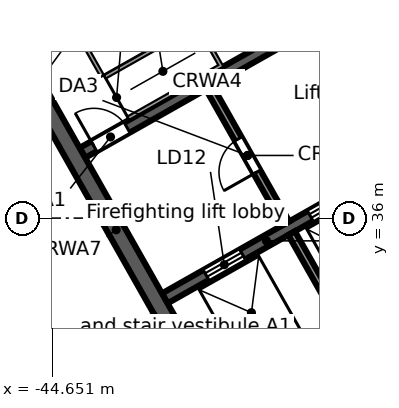
"""IFC4 building model, lengths in metres.
Left out: names, types, materials, properties, quantities, classifications, styles, units other than length and angle.
Written with IfcOpenShell. Run it as: python <this file> out.ifc"""

import sys

from ifc_helpers import new_model, si_unit, direction, frame, frame_2d, origin, place, context, subcontext, project, spatial, rectangle, extrude, element, fill, save


model = new_model("IFC4")
c1 = context("Model", 3, precision=1e-05, world=origin(), true_north=direction((0.0, 1.0)))
c2 = subcontext(c1, "Body", "Model", "MODEL_VIEW")
j1 = project(units=[si_unit("LENGTHUNIT", "METRE"), si_unit("PLANEANGLEUNIT", "RADIAN")], contexts=[c1])
p1 = place(None, origin())
s1 = spatial("IfcSite", under=j1, at=p1, CompositionType="ELEMENT")
p2 = place(p1, origin())
s2 = spatial("IfcBuilding", under=s1, at=p2, CompositionType="ELEMENT")
p3 = place(p2, frame((0.0, 0.0, 223.1)))
s3 = spatial("IfcBuildingStorey", under=s2, at=p3, CompositionType="ELEMENT", Elevation=223.1)
p4 = place(p3, frame((-0.046, 47.974, 0.0), z_axis=(0.0, 0.0, 1.0), x_axis=(-0.870356579543, -0.492421998337, 0.0)))
e1 = element("IfcWall", 1, at=p4, inside=s3, PredefinedType="STANDARD", context=c2, shape_type="SweptSolid", body=[
    extrude(rectangle(XDim=43.754, YDim=0.25, at=frame_2d((21.877, 0.0))), origin(), (0.0, 0.0, 1.0), 3.62),
])
p5 = place(p4, frame((41.061, 0.0, 0.8)))
e2 = element("IfcOpeningElement", 2, at=p5, cuts=e1, PredefinedType="OPENING", context=c2, shape_type="SweptSolid", body=[
    extrude(rectangle(XDim=2.4, YDim=2.2, at=frame_2d((1.2, 1.1))), frame((0.0, 0.135, 0.0), z_axis=(0.0, -1.0, 0.0), x_axis=(1.0, 0.0, 0.0)), (0.0, 0.0, 1.0), 0.27),
])
p6 = place(p4, frame((38.443, 0.0, 0.0)))
e3 = element("IfcOpeningElement", 3, at=p6, cuts=e1, PredefinedType="OPENING", context=c2, shape_type="SweptSolid", body=[
    extrude(rectangle(XDim=1.8, YDim=2.4, at=frame_2d((0.9, 1.2))), frame((0.0, 0.135, 0.0), z_axis=(0.0, -1.0, 0.0), x_axis=(1.0, 0.0, 0.0)), (0.0, 0.0, 1.0), 0.27),
])
p7 = place(p4, frame((35.225, 0.0, 0.8)))
e4 = element("IfcOpeningElement", 4, at=p7, cuts=e1, PredefinedType="OPENING", context=c2, shape_type="SweptSolid", body=[
    extrude(rectangle(XDim=2.4, YDim=2.2, at=frame_2d((1.2, 1.1))), frame((0.0, 0.135, 0.0), z_axis=(0.0, -1.0, 0.0), x_axis=(1.0, 0.0, 0.0)), (0.0, 0.0, 1.0), 0.27),
])
p8 = place(p4, frame((32.307, 0.0, 0.8)))
e5 = element("IfcOpeningElement", 5, at=p8, cuts=e1, PredefinedType="OPENING", context=c2, shape_type="SweptSolid", body=[
    extrude(rectangle(XDim=2.4, YDim=2.2, at=frame_2d((1.2, 1.1))), frame((0.0, 0.135, 0.0), z_axis=(0.0, -1.0, 0.0), x_axis=(1.0, 0.0, 0.0)), (0.0, 0.0, 1.0), 0.27),
])
p9 = place(p4, frame((29.688, 0.0, 0.0)))
e6 = element("IfcOpeningElement", 6, at=p9, cuts=e1, PredefinedType="OPENING", context=c2, shape_type="SweptSolid", body=[
    extrude(rectangle(XDim=1.8, YDim=2.4, at=frame_2d((0.9, 1.2))), frame((0.0, 0.135, 0.0), z_axis=(0.0, -1.0, 0.0), x_axis=(1.0, 0.0, 0.0)), (0.0, 0.0, 1.0), 0.27),
])
p10 = place(p4, frame((26.47, 0.0, 0.8)))
e7 = element("IfcOpeningElement", 7, at=p10, cuts=e1, PredefinedType="OPENING", context=c2, shape_type="SweptSolid", body=[
    extrude(rectangle(XDim=2.4, YDim=2.2, at=frame_2d((1.2, 1.1))), frame((0.0, 0.135, 0.0), z_axis=(0.0, -1.0, 0.0), x_axis=(1.0, 0.0, 0.0)), (0.0, 0.0, 1.0), 0.27),
])
p11 = place(p4, frame((23.552, 0.0, 0.8)))
e8 = element("IfcOpeningElement", 8, at=p11, cuts=e1, PredefinedType="OPENING", context=c2, shape_type="SweptSolid", body=[
    extrude(rectangle(XDim=2.4, YDim=2.2, at=frame_2d((1.2, 1.1))), frame((0.0, 0.135, 0.0), z_axis=(0.0, -1.0, 0.0), x_axis=(1.0, 0.0, 0.0)), (0.0, 0.0, 1.0), 0.27),
])
p12 = place(p4, frame((20.934, 0.0, 0.0)))
e9 = element("IfcOpeningElement", 9, at=p12, cuts=e1, PredefinedType="OPENING", context=c2, shape_type="SweptSolid", body=[
    extrude(rectangle(XDim=1.8, YDim=2.4, at=frame_2d((0.9, 1.2))), frame((0.0, 0.135, 0.0), z_axis=(0.0, -1.0, 0.0), x_axis=(1.0, 0.0, 0.0)), (0.0, 0.0, 1.0), 0.27),
])
p13 = place(p4, frame((17.716, 0.0, 0.8)))
e10 = element("IfcOpeningElement", 10, at=p13, cuts=e1, PredefinedType="OPENING", context=c2, shape_type="SweptSolid", body=[
    extrude(rectangle(XDim=2.4, YDim=2.2, at=frame_2d((1.2, 1.1))), frame((0.0, 0.135, 0.0), z_axis=(0.0, -1.0, 0.0), x_axis=(1.0, 0.0, 0.0)), (0.0, 0.0, 1.0), 0.27),
])
p14 = place(p4, frame((14.798, 0.0, 0.8)))
e11 = element("IfcOpeningElement", 11, at=p14, cuts=e1, PredefinedType="OPENING", context=c2, shape_type="SweptSolid", body=[
    extrude(rectangle(XDim=2.4, YDim=2.2, at=frame_2d((1.2, 1.1))), frame((0.0, 0.135, 0.0), z_axis=(0.0, -1.0, 0.0), x_axis=(1.0, 0.0, 0.0)), (0.0, 0.0, 1.0), 0.27),
])
p15 = place(p4, frame((12.179, 0.0, 0.0)))
e12 = element("IfcOpeningElement", 12, at=p15, cuts=e1, PredefinedType="OPENING", context=c2, shape_type="SweptSolid", body=[
    extrude(rectangle(XDim=1.8, YDim=2.4, at=frame_2d((0.9, 1.2))), frame((0.0, 0.135, 0.0), z_axis=(0.0, -1.0, 0.0), x_axis=(1.0, 0.0, 0.0)), (0.0, 0.0, 1.0), 0.27),
])
p16 = place(p4, frame((8.961, 0.0, 0.8)))
e13 = element("IfcOpeningElement", 13, at=p16, cuts=e1, PredefinedType="OPENING", context=c2, shape_type="SweptSolid", body=[
    extrude(rectangle(XDim=2.4, YDim=2.2, at=frame_2d((1.2, 1.1))), frame((0.0, 0.135, 0.0), z_axis=(0.0, -1.0, 0.0), x_axis=(1.0, 0.0, 0.0)), (0.0, 0.0, 1.0), 0.27),
])
p17 = place(p4, frame((6.043, 0.0, 0.8)))
e14 = element("IfcOpeningElement", 14, at=p17, cuts=e1, PredefinedType="OPENING", context=c2, shape_type="SweptSolid", body=[
    extrude(rectangle(XDim=2.4, YDim=2.2, at=frame_2d((1.2, 1.1))), frame((0.0, 0.135, 0.0), z_axis=(0.0, -1.0, 0.0), x_axis=(1.0, 0.0, 0.0)), (0.0, 0.0, 1.0), 0.27),
])
p18 = place(p4, frame((3.425, 0.0, 0.0)))
e15 = element("IfcOpeningElement", 15, at=p18, cuts=e1, PredefinedType="OPENING", context=c2, shape_type="SweptSolid", body=[
    extrude(rectangle(XDim=1.8, YDim=2.4, at=frame_2d((0.9, 1.2))), frame((0.0, 0.135, 0.0), z_axis=(0.0, -1.0, 0.0), x_axis=(1.0, 0.0, 0.0)), (0.0, 0.0, 1.0), 0.27),
])
p19 = place(p4, frame((0.207, 0.0, 0.8)))
e16 = element("IfcOpeningElement", 16, at=p19, cuts=e1, PredefinedType="OPENING", context=c2, shape_type="SweptSolid", body=[
    extrude(rectangle(XDim=2.4, YDim=2.2, at=frame_2d((1.2, 1.1))), frame((0.0, 0.135, 0.0), z_axis=(0.0, -1.0, 0.0), x_axis=(1.0, 0.0, 0.0)), (0.0, 0.0, 1.0), 0.27),
])
p20 = place(p3, frame((-58.732, 38.771, 0.0), z_axis=(0.0, 0.0, 1.0), x_axis=(0.870354824205, 0.492425100887, 0.0)))
e17 = element("IfcWall", 17, at=p20, inside=s3, PredefinedType="STANDARD", context=c2, shape_type="SweptSolid", body=[
    extrude(rectangle(XDim=64.006, YDim=0.25, at=frame_2d((32.003, 0.0))), origin(), (0.0, 0.0, 1.0), 3.62),
])
p21 = place(p20, frame((61.259, 0.0, 0.8)))
e18 = element("IfcOpeningElement", 18, at=p21, cuts=e17, PredefinedType="OPENING", context=c2, shape_type="SweptSolid", body=[
    extrude(rectangle(XDim=2.4, YDim=2.2, at=frame_2d((1.2, 1.1))), frame((0.0, 0.135, 0.0), z_axis=(0.0, -1.0, 0.0), x_axis=(1.0, 0.0, 0.0)), (0.0, 0.0, 1.0), 0.27),
])
p22 = place(p20, frame((58.216, 0.0, 0.8)))
e19 = element("IfcOpeningElement", 19, at=p22, cuts=e17, PredefinedType="OPENING", context=c2, shape_type="SweptSolid", body=[
    extrude(rectangle(XDim=2.4, YDim=2.2, at=frame_2d((1.2, 1.1))), frame((0.0, 0.135, 0.0), z_axis=(0.0, -1.0, 0.0), x_axis=(1.0, 0.0, 0.0)), (0.0, 0.0, 1.0), 0.27),
])
p23 = place(p20, frame((55.173, 0.0, 0.8)))
e20 = element("IfcOpeningElement", 20, at=p23, cuts=e17, PredefinedType="OPENING", context=c2, shape_type="SweptSolid", body=[
    extrude(rectangle(XDim=2.4, YDim=2.2, at=frame_2d((1.2, 1.1))), frame((0.0, 0.135, 0.0), z_axis=(0.0, -1.0, 0.0), x_axis=(1.0, 0.0, 0.0)), (0.0, 0.0, 1.0), 0.27),
])
p24 = place(p20, frame((52.129, 0.0, 0.8)))
e21 = element("IfcOpeningElement", 21, at=p24, cuts=e17, PredefinedType="OPENING", context=c2, shape_type="SweptSolid", body=[
    extrude(rectangle(XDim=2.4, YDim=2.2, at=frame_2d((1.2, 1.1))), frame((0.0, 0.135, 0.0), z_axis=(0.0, -1.0, 0.0), x_axis=(1.0, 0.0, 0.0)), (0.0, 0.0, 1.0), 0.27),
])
p25 = place(p20, frame((49.086, 0.0, 0.8)))
e22 = element("IfcOpeningElement", 22, at=p25, cuts=e17, PredefinedType="OPENING", context=c2, shape_type="SweptSolid", body=[
    extrude(rectangle(XDim=2.4, YDim=2.2, at=frame_2d((1.2, 1.1))), frame((0.0, 0.135, 0.0), z_axis=(0.0, -1.0, 0.0), x_axis=(1.0, 0.0, 0.0)), (0.0, 0.0, 1.0), 0.27),
])
p26 = place(p20, frame((46.043, 0.0, 0.8)))
e23 = element("IfcOpeningElement", 23, at=p26, cuts=e17, PredefinedType="OPENING", context=c2, shape_type="SweptSolid", body=[
    extrude(rectangle(XDim=2.4, YDim=2.2, at=frame_2d((1.2, 1.1))), frame((0.0, 0.135, 0.0), z_axis=(0.0, -1.0, 0.0), x_axis=(1.0, 0.0, 0.0)), (0.0, 0.0, 1.0), 0.27),
])
p27 = place(p20, frame((43.0, 0.0, 0.8)))
e24 = element("IfcOpeningElement", 24, at=p27, cuts=e17, PredefinedType="OPENING", context=c2, shape_type="SweptSolid", body=[
    extrude(rectangle(XDim=2.4, YDim=2.2, at=frame_2d((1.2, 1.1))), frame((0.0, 0.135, 0.0), z_axis=(0.0, -1.0, 0.0), x_axis=(1.0, 0.0, 0.0)), (0.0, 0.0, 1.0), 0.27),
])
p28 = place(p20, frame((39.956, 0.0, 0.8)))
e25 = element("IfcOpeningElement", 25, at=p28, cuts=e17, PredefinedType="OPENING", context=c2, shape_type="SweptSolid", body=[
    extrude(rectangle(XDim=2.4, YDim=2.2, at=frame_2d((1.2, 1.1))), frame((0.0, 0.135, 0.0), z_axis=(0.0, -1.0, 0.0), x_axis=(1.0, 0.0, 0.0)), (0.0, 0.0, 1.0), 0.27),
])
p29 = place(p20, frame((36.913, 0.0, 0.8)))
e26 = element("IfcOpeningElement", 26, at=p29, cuts=e17, PredefinedType="OPENING", context=c2, shape_type="SweptSolid", body=[
    extrude(rectangle(XDim=2.4, YDim=2.2, at=frame_2d((1.2, 1.1))), frame((0.0, 0.135, 0.0), z_axis=(0.0, -1.0, 0.0), x_axis=(1.0, 0.0, 0.0)), (0.0, 0.0, 1.0), 0.27),
])
p30 = place(p20, frame((33.87, 0.0, 0.8)))
e27 = element("IfcOpeningElement", 27, at=p30, cuts=e17, PredefinedType="OPENING", context=c2, shape_type="SweptSolid", body=[
    extrude(rectangle(XDim=2.4, YDim=2.2, at=frame_2d((1.2, 1.1))), frame((0.0, 0.135, 0.0), z_axis=(0.0, -1.0, 0.0), x_axis=(1.0, 0.0, 0.0)), (0.0, 0.0, 1.0), 0.27),
])
p31 = place(p20, frame((30.826, 0.0, 0.8)))
e28 = element("IfcOpeningElement", 28, at=p31, cuts=e17, PredefinedType="OPENING", context=c2, shape_type="SweptSolid", body=[
    extrude(rectangle(XDim=2.4, YDim=2.2, at=frame_2d((1.2, 1.1))), frame((0.0, 0.135, 0.0), z_axis=(0.0, -1.0, 0.0), x_axis=(1.0, 0.0, 0.0)), (0.0, 0.0, 1.0), 0.27),
])
p32 = place(p20, frame((27.783, 0.0, 0.8)))
e29 = element("IfcOpeningElement", 29, at=p32, cuts=e17, PredefinedType="OPENING", context=c2, shape_type="SweptSolid", body=[
    extrude(rectangle(XDim=2.4, YDim=2.2, at=frame_2d((1.2, 1.1))), frame((0.0, 0.135, 0.0), z_axis=(0.0, -1.0, 0.0), x_axis=(1.0, 0.0, 0.0)), (0.0, 0.0, 1.0), 0.27),
])
p33 = place(p20, frame((24.74, 0.0, 0.8)))
e30 = element("IfcOpeningElement", 30, at=p33, cuts=e17, PredefinedType="OPENING", context=c2, shape_type="SweptSolid", body=[
    extrude(rectangle(XDim=2.4, YDim=2.2, at=frame_2d((1.2, 1.1))), frame((0.0, 0.135, 0.0), z_axis=(0.0, -1.0, 0.0), x_axis=(1.0, 0.0, 0.0)), (0.0, 0.0, 1.0), 0.27),
])
p34 = place(p20, frame((21.696, 0.0, 0.8)))
e31 = element("IfcOpeningElement", 31, at=p34, cuts=e17, PredefinedType="OPENING", context=c2, shape_type="SweptSolid", body=[
    extrude(rectangle(XDim=2.4, YDim=2.2, at=frame_2d((1.2, 1.1))), frame((0.0, 0.135, 0.0), z_axis=(0.0, -1.0, 0.0), x_axis=(1.0, 0.0, 0.0)), (0.0, 0.0, 1.0), 0.27),
])
p35 = place(p20, frame((18.653, 0.0, 0.8)))
e32 = element("IfcOpeningElement", 32, at=p35, cuts=e17, PredefinedType="OPENING", context=c2, shape_type="SweptSolid", body=[
    extrude(rectangle(XDim=2.4, YDim=2.2, at=frame_2d((1.2, 1.1))), frame((0.0, 0.135, 0.0), z_axis=(0.0, -1.0, 0.0), x_axis=(1.0, 0.0, 0.0)), (0.0, 0.0, 1.0), 0.27),
])
p36 = place(p20, frame((15.61, 0.0, 0.8)))
e33 = element("IfcOpeningElement", 33, at=p36, cuts=e17, PredefinedType="OPENING", context=c2, shape_type="SweptSolid", body=[
    extrude(rectangle(XDim=2.4, YDim=2.2, at=frame_2d((1.2, 1.1))), frame((0.0, 0.135, 0.0), z_axis=(0.0, -1.0, 0.0), x_axis=(1.0, 0.0, 0.0)), (0.0, 0.0, 1.0), 0.27),
])
p37 = place(p20, frame((12.567, 0.0, 0.8)))
e34 = element("IfcOpeningElement", 34, at=p37, cuts=e17, PredefinedType="OPENING", context=c2, shape_type="SweptSolid", body=[
    extrude(rectangle(XDim=2.4, YDim=2.2, at=frame_2d((1.2, 1.1))), frame((0.0, 0.135, 0.0), z_axis=(0.0, -1.0, 0.0), x_axis=(1.0, 0.0, 0.0)), (0.0, 0.0, 1.0), 0.27),
])
p38 = place(p20, frame((9.523, 0.0, 0.8)))
e35 = element("IfcOpeningElement", 35, at=p38, cuts=e17, PredefinedType="OPENING", context=c2, shape_type="SweptSolid", body=[
    extrude(rectangle(XDim=2.4, YDim=2.2, at=frame_2d((1.2, 1.1))), frame((0.0, 0.135, 0.0), z_axis=(0.0, -1.0, 0.0), x_axis=(1.0, 0.0, 0.0)), (0.0, 0.0, 1.0), 0.27),
])
p39 = place(p20, frame((6.48, 0.0, 0.8)))
e36 = element("IfcOpeningElement", 36, at=p39, cuts=e17, PredefinedType="OPENING", context=c2, shape_type="SweptSolid", body=[
    extrude(rectangle(XDim=2.4, YDim=2.2, at=frame_2d((1.2, 1.1))), frame((0.0, 0.135, 0.0), z_axis=(0.0, -1.0, 0.0), x_axis=(1.0, 0.0, 0.0)), (0.0, 0.0, 1.0), 0.27),
])
p40 = place(p20, frame((3.437, 0.0, 0.8)))
e37 = element("IfcOpeningElement", 37, at=p40, cuts=e17, PredefinedType="OPENING", context=c2, shape_type="SweptSolid", body=[
    extrude(rectangle(XDim=2.4, YDim=2.2, at=frame_2d((1.2, 1.1))), frame((0.0, 0.135, 0.0), z_axis=(0.0, -1.0, 0.0), x_axis=(1.0, 0.0, 0.0)), (0.0, 0.0, 1.0), 0.27),
])
p41 = place(p20, frame((0.393, 0.0, 0.8)))
e38 = element("IfcOpeningElement", 38, at=p41, cuts=e17, PredefinedType="OPENING", context=c2, shape_type="SweptSolid", body=[
    extrude(rectangle(XDim=2.4, YDim=2.2, at=frame_2d((1.2, 1.1))), frame((0.0, 0.135, 0.0), z_axis=(0.0, -1.0, 0.0), x_axis=(1.0, 0.0, 0.0)), (0.0, 0.0, 1.0), 0.27),
])
p42 = place(p3, frame((-44.115, 26.507, 0.0), z_axis=(0.0, 0.0, 1.0), x_axis=(-0.857166583633, 0.515039268311, 0.0)))
e39 = element("IfcWall", 39, at=p42, inside=s3, PredefinedType="STANDARD", context=c2, shape_type="SweptSolid", body=[
    extrude(rectangle(XDim=17.106, YDim=0.25, at=frame_2d((8.553, 0.0))), origin(), (0.0, 0.0, 1.0), 3.62),
])
p43 = place(p42, frame((14.417, 0.0, 0.8)))
e40 = element("IfcOpeningElement", 40, at=p43, cuts=e39, PredefinedType="OPENING", context=c2, shape_type="SweptSolid", body=[
    extrude(rectangle(XDim=2.4, YDim=2.2, at=frame_2d((1.2, 1.1))), frame((0.0, 0.135, 0.0), z_axis=(0.0, -1.0, 0.0), x_axis=(1.0, 0.0, 0.0)), (0.0, 0.0, 1.0), 0.27),
])
p44 = place(p42, frame((11.584, 0.0, 0.8)))
e41 = element("IfcOpeningElement", 41, at=p44, cuts=e39, PredefinedType="OPENING", context=c2, shape_type="SweptSolid", body=[
    extrude(rectangle(XDim=2.4, YDim=2.2, at=frame_2d((1.2, 1.1))), frame((0.0, 0.135, 0.0), z_axis=(0.0, -1.0, 0.0), x_axis=(1.0, 0.0, 0.0)), (0.0, 0.0, 1.0), 0.27),
])
p45 = place(p42, frame((8.75, 0.0, 0.8)))
e42 = element("IfcOpeningElement", 42, at=p45, cuts=e39, PredefinedType="OPENING", context=c2, shape_type="SweptSolid", body=[
    extrude(rectangle(XDim=2.4, YDim=2.2, at=frame_2d((1.2, 1.1))), frame((0.0, 0.135, 0.0), z_axis=(0.0, -1.0, 0.0), x_axis=(1.0, 0.0, 0.0)), (0.0, 0.0, 1.0), 0.27),
])
p46 = place(p42, frame((5.917, 0.0, 0.8)))
e43 = element("IfcOpeningElement", 43, at=p46, cuts=e39, PredefinedType="OPENING", context=c2, shape_type="SweptSolid", body=[
    extrude(rectangle(XDim=2.4, YDim=2.2, at=frame_2d((1.2, 1.1))), frame((0.0, 0.135, 0.0), z_axis=(0.0, -1.0, 0.0), x_axis=(1.0, 0.0, 0.0)), (0.0, 0.0, 1.0), 0.27),
])
p47 = place(p42, frame((3.084, 0.0, 0.8)))
e44 = element("IfcOpeningElement", 44, at=p47, cuts=e39, PredefinedType="OPENING", context=c2, shape_type="SweptSolid", body=[
    extrude(rectangle(XDim=2.4, YDim=2.2, at=frame_2d((1.2, 1.1))), frame((0.0, 0.135, 0.0), z_axis=(0.0, -1.0, 0.0), x_axis=(1.0, 0.0, 0.0)), (0.0, 0.0, 1.0), 0.27),
])
p48 = place(p42, frame((0.25, 0.0, 0.8)))
e45 = element("IfcOpeningElement", 45, at=p48, cuts=e39, PredefinedType="OPENING", context=c2, shape_type="SweptSolid", body=[
    extrude(rectangle(XDim=2.4, YDim=2.2, at=frame_2d((1.2, 1.1))), frame((0.0, 0.135, 0.0), z_axis=(0.0, -1.0, 0.0), x_axis=(1.0, 0.0, 0.0)), (0.0, 0.0, 1.0), 0.27),
])
p49 = place(p3, frame((-39.825, 29.684, 0.0), z_axis=(0.0, 0.0, 1.0), x_axis=(0.870353598469, 0.492427267353, 0.0)))
e46 = element("IfcWall", 46, at=p49, inside=s3, PredefinedType="SOLIDWALL", context=c2, shape_type="SweptSolid", body=[
    extrude(rectangle(XDim=17.0, YDim=0.45, at=frame_2d((8.5, 0.0))), origin(), (0.0, 0.0, 1.0), 3.62),
])
p50 = place(p49, frame((7.2, 0.0, 0.0)))
e47 = element("IfcOpeningElement", 47, at=p50, cuts=e46, PredefinedType="OPENING", context=c2, shape_type="SweptSolid", body=[
    extrude(rectangle(XDim=1.2, YDim=2.1, at=frame_2d((0.6, 1.05))), frame((0.0, 0.235, 0.0), z_axis=(0.0, -1.0, 0.0), x_axis=(1.0, 0.0, 0.0)), (0.0, 0.0, 1.0), 0.47),
])
p51 = place(p3, frame((-41.687, 33.887, 0.0), z_axis=(0.0, 0.0, 1.0), x_axis=(0.870355736587, 0.49242348826, 0.0)))
e48 = element("IfcWall", 48, at=p51, inside=s3, PredefinedType="SOLIDWALL", context=c2, shape_type="SweptSolid", body=[
    extrude(rectangle(XDim=6.15, YDim=0.3, at=frame_2d((3.075, 0.0))), origin(), (0.0, 0.0, 1.0), 3.62),
])
p52 = place(p51, frame((1.25, 0.0, 0.0)))
e49 = element("IfcOpeningElement", 49, at=p52, cuts=e48, PredefinedType="OPENING", context=c2, shape_type="SweptSolid", body=[
    extrude(rectangle(XDim=1.1, YDim=2.1, at=frame_2d((0.55, 1.05))), frame((0.0, 0.16, 0.0), z_axis=(0.0, -1.0, 0.0), x_axis=(1.0, 0.0, 0.0)), (0.0, 0.0, 1.0), 0.32),
])
p53 = place(p51, frame((4.4, 0.0, 0.0)))
e50 = element("IfcOpeningElement", 50, at=p53, cuts=e48, PredefinedType="OPENING", context=c2, shape_type="SweptSolid", body=[
    extrude(rectangle(XDim=1.1, YDim=2.1, at=frame_2d((0.55, 1.05))), frame((0.0, 0.16, 0.0), z_axis=(0.0, -1.0, 0.0), x_axis=(1.0, 0.0, 0.0)), (0.0, 0.0, 1.0), 0.32),
])
p54 = place(p3, frame((-43.853, 37.717, 0.0), z_axis=(0.0, 0.0, 1.0), x_axis=(0.870360409231, 0.492415229297, 0.0)))
e51 = element("IfcWall", 51, at=p54, inside=s3, PredefinedType="SOLIDWALL", context=c2, shape_type="SweptSolid", body=[
    extrude(rectangle(XDim=7.55, YDim=0.3, at=frame_2d((3.775, 0.0))), origin(), (0.0, 0.0, 1.0), 3.62),
])
p55 = place(p54, frame((0.35, 0.0, 0.0)))
e52 = element("IfcOpeningElement", 52, at=p55, cuts=e51, PredefinedType="OPENING", context=c2, shape_type="SweptSolid", body=[
    extrude(rectangle(XDim=1.0, YDim=2.1, at=frame_2d((0.5, 1.05))), frame((0.0, 0.16, 0.0), z_axis=(0.0, -1.0, 0.0), x_axis=(1.0, 0.0, 0.0)), (0.0, 0.0, 1.0), 0.32),
])
p56 = place(p3, frame((-46.191, 41.392, 0.0), z_axis=(0.0, 0.0, 1.0), x_axis=(0.492421378713, -0.870356930107, 0.0)))
e53 = element("IfcWall", 53, at=p56, inside=s3, PredefinedType="SOLIDWALL", context=c2, shape_type="SweptSolid", body=[
    extrude(rectangle(XDim=13.1, YDim=0.45, at=frame_2d((6.55, 0.0))), origin(), (0.0, 0.0, 1.0), 3.62),
])
p57 = place(p3, frame((-38.349, 35.603, 0.0), z_axis=(0.0, 0.0, 1.0), x_axis=(0.492409653846, -0.870363563575, 0.0)))
e54 = element("IfcWall", 54, at=p57, inside=s3, PredefinedType="SOLIDWALL", context=c2, shape_type="SweptSolid", body=[
    extrude(rectangle(XDim=4.2, YDim=0.2, at=frame_2d((2.1, 0.0))), origin(), (0.0, 0.0, 1.0), 3.62),
])
p58 = place(p3, frame((-40.516, 39.433, 0.0), z_axis=(0.0, 0.0, 1.0), x_axis=(0.492453559952, -0.87033872216, 0.0)))
e55 = element("IfcWall", 55, at=p58, inside=s3, PredefinedType="PARTITIONING", context=c2, shape_type="SweptSolid", body=[
    extrude(rectangle(XDim=4.1, YDim=0.2, at=frame_2d((2.05, 0.0))), origin(), (0.0, 0.0, 1.0), 3.62),
])
p59 = place(p58, frame((1.55, 0.0, 0.0)))
e56 = element("IfcOpeningElement", 56, at=p59, cuts=e55, PredefinedType="OPENING", context=c2, shape_type="SweptSolid", body=[
    extrude(rectangle(XDim=1.0, YDim=2.1, at=frame_2d((0.5, 1.05))), frame((0.0, 0.11, 0.0), z_axis=(0.0, -1.0, 0.0), x_axis=(1.0, 0.0, 0.0)), (0.0, 0.0, 1.0), 0.22),
])
p60 = place(p3, frame((-46.935, 30.573, 0.0), z_axis=(0.0, 0.0, 1.0), x_axis=(0.870367427407, 0.492402824229, 0.0)))
e57 = element("IfcWall", 57, at=p60, inside=s3, PredefinedType="PARTITIONING", context=c2, shape_type="SweptSolid", body=[
    extrude(rectangle(XDim=5.75, YDim=0.125, at=frame_2d((2.875, 0.0))), origin(), (0.0, 0.0, 1.0), 3.62),
])
p61 = place(p60, frame((2.45, 0.0, 0.0)))
e58 = element("IfcOpeningElement", 58, at=p61, cuts=e57, PredefinedType="OPENING", context=c2, shape_type="SweptSolid", body=[
    extrude(rectangle(XDim=0.9, YDim=2.1, at=frame_2d((0.45, 1.05))), frame((0.0, 0.073, 0.0), z_axis=(0.0, -1.0, 0.0), x_axis=(1.0, 0.0, 0.0)), (0.0, 0.0, 1.0), 0.145),
])
p62 = place(p52, origin())
e59 = element("IfcDoor", 59, at=p62, inside=s3, OperationType="DOUBLE_DOOR_SLIDING", PredefinedType="DOOR", context=c2, shape_type="SweptSolid", body=[
    extrude(rectangle(XDim=1.1, YDim=2.1, at=frame_2d((0.55, 1.05))), frame((0.0, 0.025, 0.0), z_axis=(0.0, -1.0, 0.0), x_axis=(1.0, 0.0, 0.0)), (0.0, 0.0, 1.0), 0.05),
])
fill(e49, e59)
p63 = place(p53, origin())
e60 = element("IfcDoor", 60, at=p63, inside=s3, OperationType="DOUBLE_DOOR_SLIDING", PredefinedType="DOOR", context=c2, shape_type="SweptSolid", body=[
    extrude(rectangle(XDim=1.1, YDim=2.1, at=frame_2d((0.55, 1.05))), frame((0.0, 0.025, 0.0), z_axis=(0.0, -1.0, 0.0), x_axis=(1.0, 0.0, 0.0)), (0.0, 0.0, 1.0), 0.05),
])
fill(e50, e60)
p64 = place(p55, origin())
e61 = element("IfcDoor", 61, at=p64, inside=s3, OperationType="SINGLE_SWING_LEFT", PredefinedType="DOOR", context=c2, shape_type="SweptSolid", body=[
    extrude(rectangle(XDim=1.0, YDim=2.1, at=frame_2d((0.5, 1.05))), frame((0.0, 0.025, 0.0), z_axis=(0.0, -1.0, 0.0), x_axis=(1.0, 0.0, 0.0)), (0.0, 0.0, 1.0), 0.05),
])
fill(e52, e61)
p65 = place(p59, frame((1.0, 0.0, 0.0), z_axis=(0.0, 0.0, 1.0), x_axis=(-1.0, 0.0, 0.0)))
e62 = element("IfcDoor", 62, at=p65, inside=s3, OperationType="SINGLE_SWING_LEFT", PredefinedType="DOOR", context=c2, shape_type="SweptSolid", body=[
    extrude(rectangle(XDim=1.0, YDim=2.1, at=frame_2d((0.5, 1.05))), frame((0.0, 0.025, 0.0), z_axis=(0.0, -1.0, 0.0), x_axis=(1.0, 0.0, 0.0)), (0.0, 0.0, 1.0), 0.05),
])
fill(e56, e62)
save(model, sys.argv[1])
